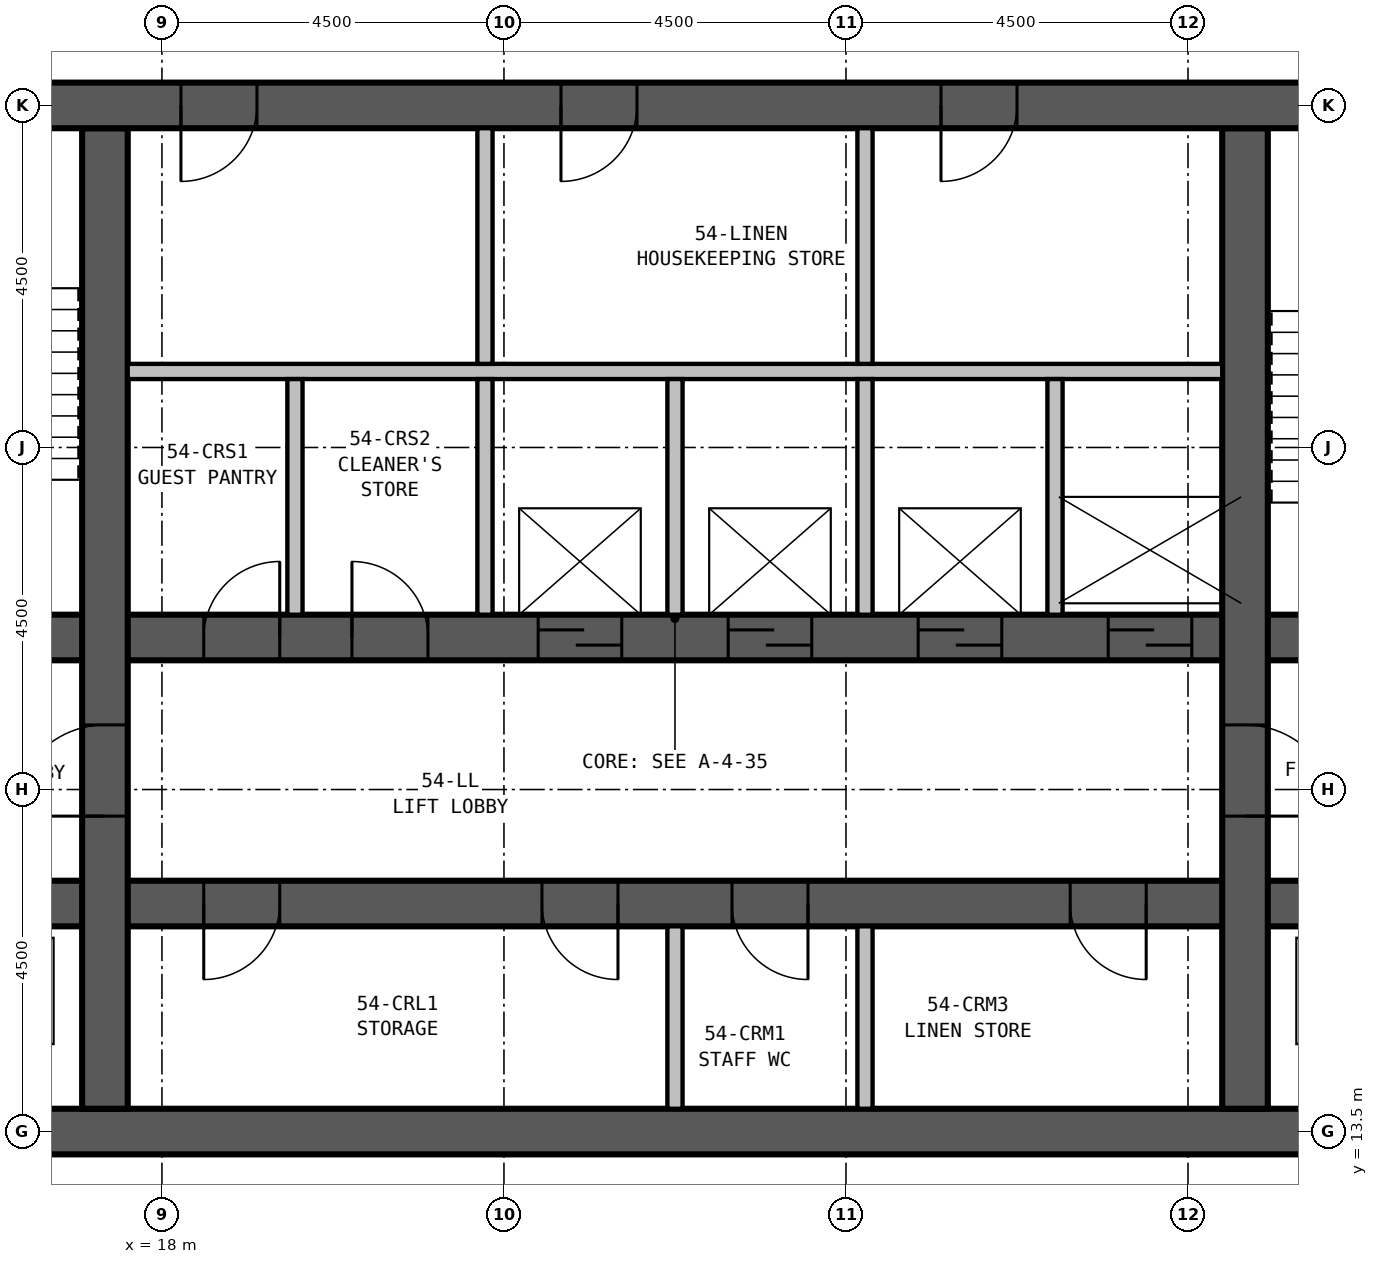
"""IFC4 building model, lengths in metres.
Left out: names, types, materials, properties, quantities, classifications, styles, units other than length and angle.
Written with IfcOpenShell. Run it as: python <this file> out.ifc"""

import sys

from ifc_helpers import new_model, si_unit, direction, frame, frame_2d, origin, place, context, subcontext, project, spatial, rectangle, extrude, element, fill, save


model = new_model("IFC4")
c1 = context("Model", 3, precision=1e-05, world=origin(), true_north=direction((0.0, 1.0)))
c2 = subcontext(c1, "Body", "Model", "MODEL_VIEW")
j1 = project(units=[si_unit("LENGTHUNIT", "METRE"), si_unit("PLANEANGLEUNIT", "RADIAN")], contexts=[c1])
p1 = place(None, origin())
s1 = spatial("IfcSite", under=j1, at=p1, CompositionType="ELEMENT")
p2 = place(p1, origin())
s2 = spatial("IfcBuilding", under=s1, at=p2, CompositionType="ELEMENT")
p3 = place(p2, frame((0.0, 0.0, 207.9)))
s3 = spatial("IfcBuildingStorey", under=s2, at=p3, CompositionType="ELEMENT", Elevation=207.9)
p4 = place(p3, frame((13.2, 13.5, 0.0), z_axis=(0.0, 0.0, 1.0), x_axis=(1.0, 0.0, 0.0)))
e1 = element("IfcWall", 1, at=p4, inside=s3, PredefinedType="SHEAR", context=c2, shape_type="SweptSolid", body=[
    extrude(rectangle(XDim=23.1, YDim=0.6, at=frame_2d((11.55, 0.0))), origin(), (0.0, 0.0, 1.0), 3.5),
])
p5 = place(p3, frame((36.3, 27.0, 0.0), z_axis=(0.0, 0.0, 1.0), x_axis=(-1.0, 0.0, 0.0)))
e2 = element("IfcWall", 2, at=p5, inside=s3, PredefinedType="SHEAR", context=c2, shape_type="SweptSolid", body=[
    extrude(rectangle(XDim=23.1, YDim=0.6, at=frame_2d((11.55, 0.0))), origin(), (0.0, 0.0, 1.0), 3.5),
])
p6 = place(p5, frame((17.05, 0.0, 0.0)))
e3 = element("IfcOpeningElement", 3, at=p6, cuts=e2, PredefinedType="OPENING", context=c2, shape_type="SweptSolid", body=[
    extrude(rectangle(XDim=1.0, YDim=2.1, at=frame_2d((0.5, 1.05))), frame((0.0, 0.31, 0.0), z_axis=(0.0, -1.0, 0.0), x_axis=(1.0, 0.0, 0.0)), (0.0, 0.0, 1.0), 0.62),
])
p7 = place(p5, frame((12.05, 0.0, 0.0)))
e4 = element("IfcOpeningElement", 4, at=p7, cuts=e2, PredefinedType="OPENING", context=c2, shape_type="SweptSolid", body=[
    extrude(rectangle(XDim=1.0, YDim=2.1, at=frame_2d((0.5, 1.05))), frame((0.0, 0.31, 0.0), z_axis=(0.0, -1.0, 0.0), x_axis=(1.0, 0.0, 0.0)), (0.0, 0.0, 1.0), 0.62),
])
p8 = place(p5, frame((7.05, 0.0, 0.0)))
e5 = element("IfcOpeningElement", 5, at=p8, cuts=e2, PredefinedType="OPENING", context=c2, shape_type="SweptSolid", body=[
    extrude(rectangle(XDim=1.0, YDim=2.1, at=frame_2d((0.5, 1.05))), frame((0.0, 0.31, 0.0), z_axis=(0.0, -1.0, 0.0), x_axis=(1.0, 0.0, 0.0)), (0.0, 0.0, 1.0), 0.62),
])
p9 = place(p3, frame((17.25, 13.8, 0.0), z_axis=(0.0, 0.0, 1.0), x_axis=(0.0, 1.0, 0.0)))
e6 = element("IfcWall", 6, at=p9, inside=s3, PredefinedType="SHEAR", context=c2, shape_type="SweptSolid", body=[
    extrude(rectangle(XDim=12.9, YDim=0.6, at=frame_2d((6.45, 0.0))), origin(), (0.0, 0.0, 1.0), 3.5),
])
p10 = place(p9, frame((3.85, 0.0, 0.0)))
e7 = element("IfcOpeningElement", 7, at=p10, cuts=e6, PredefinedType="OPENING", context=c2, shape_type="SweptSolid", body=[
    extrude(rectangle(XDim=1.2, YDim=2.1, at=frame_2d((0.6, 1.05))), frame((0.0, 0.31, 0.0), z_axis=(0.0, -1.0, 0.0), x_axis=(1.0, 0.0, 0.0)), (0.0, 0.0, 1.0), 0.62),
])
p11 = place(p3, frame((32.25, 13.8, 0.0), z_axis=(0.0, 0.0, 1.0), x_axis=(0.0, 1.0, 0.0)))
e8 = element("IfcWall", 8, at=p11, inside=s3, PredefinedType="SHEAR", context=c2, shape_type="SweptSolid", body=[
    extrude(rectangle(XDim=12.9, YDim=0.6, at=frame_2d((6.45, 0.0))), origin(), (0.0, 0.0, 1.0), 3.5),
])
p12 = place(p11, frame((5.05, 0.0, 0.0), z_axis=(0.0, 0.0, 1.0), x_axis=(-1.0, 0.0, 0.0)))
e9 = element("IfcOpeningElement", 9, at=p12, cuts=e8, PredefinedType="OPENING", context=c2, shape_type="SweptSolid", body=[
    extrude(rectangle(XDim=1.2, YDim=2.1, at=frame_2d((0.6, 1.05))), frame((0.0, 0.31, 0.0), z_axis=(0.0, -1.0, 0.0), x_axis=(1.0, 0.0, 0.0)), (0.0, 0.0, 1.0), 0.62),
])
p13 = place(p3, frame((13.8, 16.5, 0.0), z_axis=(0.0, 0.0, 1.0), x_axis=(1.0, 0.0, 0.0)))
e10 = element("IfcWall", 10, at=p13, inside=s3, PredefinedType="SHEAR", context=c2, shape_type="SweptSolid", body=[
    extrude(rectangle(XDim=21.9, YDim=0.6, at=frame_2d((10.95, 0.0))), origin(), (0.0, 0.0, 1.0), 3.5),
])
p14 = place(p13, frame((5.75, 0.0, 0.0), z_axis=(0.0, 0.0, 1.0), x_axis=(-1.0, 0.0, 0.0)))
e11 = element("IfcOpeningElement", 11, at=p14, cuts=e10, PredefinedType="OPENING", context=c2, shape_type="SweptSolid", body=[
    extrude(rectangle(XDim=1.0, YDim=2.1, at=frame_2d((0.5, 1.05))), frame((0.0, 0.31, 0.0), z_axis=(0.0, -1.0, 0.0), x_axis=(1.0, 0.0, 0.0)), (0.0, 0.0, 1.0), 0.62),
])
p15 = place(p13, frame((10.2, 0.0, 0.0), z_axis=(0.0, 0.0, 1.0), x_axis=(-1.0, 0.0, 0.0)))
e12 = element("IfcOpeningElement", 12, at=p15, cuts=e10, PredefinedType="OPENING", context=c2, shape_type="SweptSolid", body=[
    extrude(rectangle(XDim=1.0, YDim=2.1, at=frame_2d((0.5, 1.05))), frame((0.0, 0.31, 0.0), z_axis=(0.0, -1.0, 0.0), x_axis=(1.0, 0.0, 0.0)), (0.0, 0.0, 1.0), 0.62),
])
p16 = place(p13, frame((12.7, 0.0, 0.0), z_axis=(0.0, 0.0, 1.0), x_axis=(-1.0, 0.0, 0.0)))
e13 = element("IfcOpeningElement", 13, at=p16, cuts=e10, PredefinedType="OPENING", context=c2, shape_type="SweptSolid", body=[
    extrude(rectangle(XDim=1.0, YDim=2.1, at=frame_2d((0.5, 1.05))), frame((0.0, 0.31, 0.0), z_axis=(0.0, -1.0, 0.0), x_axis=(1.0, 0.0, 0.0)), (0.0, 0.0, 1.0), 0.62),
])
p17 = place(p13, frame((17.15, 0.0, 0.0), z_axis=(0.0, 0.0, 1.0), x_axis=(-1.0, 0.0, 0.0)))
e14 = element("IfcOpeningElement", 14, at=p17, cuts=e10, PredefinedType="OPENING", context=c2, shape_type="SweptSolid", body=[
    extrude(rectangle(XDim=1.0, YDim=2.1, at=frame_2d((0.5, 1.05))), frame((0.0, 0.31, 0.0), z_axis=(0.0, -1.0, 0.0), x_axis=(1.0, 0.0, 0.0)), (0.0, 0.0, 1.0), 0.62),
])
p18 = place(p13, frame((0.6, 0.0, 0.0)))
e15 = element("IfcOpeningElement", 15, at=p18, cuts=e10, PredefinedType="OPENING", context=c2, shape_type="SweptSolid", body=[
    extrude(rectangle(XDim=1.2, YDim=2.1, at=frame_2d((0.6, 1.05))), frame((0.0, 0.31, 0.0), z_axis=(0.0, -1.0, 0.0), x_axis=(1.0, 0.0, 0.0)), (0.0, 0.0, 1.0), 0.62),
])
p19 = place(p13, frame((19.6, 0.0, 0.0)))
e16 = element("IfcOpeningElement", 16, at=p19, cuts=e10, PredefinedType="OPENING", context=c2, shape_type="SweptSolid", body=[
    extrude(rectangle(XDim=1.2, YDim=2.1, at=frame_2d((0.6, 1.05))), frame((0.0, 0.31, 0.0), z_axis=(0.0, -1.0, 0.0), x_axis=(1.0, 0.0, 0.0)), (0.0, 0.0, 1.0), 0.62),
])
p20 = place(p3, frame((13.8, 20.0, 0.0), z_axis=(0.0, 0.0, 1.0), x_axis=(1.0, 0.0, 0.0)))
e17 = element("IfcWall", 17, at=p20, inside=s3, PredefinedType="SHEAR", context=c2, shape_type="SweptSolid", body=[
    extrude(rectangle(XDim=21.9, YDim=0.6, at=frame_2d((10.95, 0.0))), origin(), (0.0, 0.0, 1.0), 3.5),
])
p21 = place(p20, frame((0.5, 0.0, 0.0)))
e18 = element("IfcOpeningElement", 18, at=p21, cuts=e17, PredefinedType="OPENING", context=c2, shape_type="SweptSolid", body=[
    extrude(rectangle(XDim=1.0, YDim=2.1, at=frame_2d((0.5, 1.05))), frame((0.0, 0.31, 0.0), z_axis=(0.0, -1.0, 0.0), x_axis=(1.0, 0.0, 0.0)), (0.0, 0.0, 1.0), 0.62),
])
p22 = place(p20, frame((20.5, 0.0, 0.0)))
e19 = element("IfcOpeningElement", 19, at=p22, cuts=e17, PredefinedType="OPENING", context=c2, shape_type="SweptSolid", body=[
    extrude(rectangle(XDim=1.0, YDim=2.1, at=frame_2d((0.5, 1.05))), frame((0.0, 0.31, 0.0), z_axis=(0.0, -1.0, 0.0), x_axis=(1.0, 0.0, 0.0)), (0.0, 0.0, 1.0), 0.62),
])
p23 = place(p20, frame((9.15, 0.0, 0.0)))
e20 = element("IfcOpeningElement", 20, at=p23, cuts=e17, PredefinedType="OPENING", context=c2, shape_type="SweptSolid", body=[
    extrude(rectangle(XDim=1.1, YDim=2.1, at=frame_2d((0.55, 1.05))), frame((0.0, 0.31, 0.0), z_axis=(0.0, -1.0, 0.0), x_axis=(1.0, 0.0, 0.0)), (0.0, 0.0, 1.0), 0.62),
])
p24 = place(p20, frame((11.65, 0.0, 0.0)))
e21 = element("IfcOpeningElement", 21, at=p24, cuts=e17, PredefinedType="OPENING", context=c2, shape_type="SweptSolid", body=[
    extrude(rectangle(XDim=1.1, YDim=2.1, at=frame_2d((0.55, 1.05))), frame((0.0, 0.31, 0.0), z_axis=(0.0, -1.0, 0.0), x_axis=(1.0, 0.0, 0.0)), (0.0, 0.0, 1.0), 0.62),
])
p25 = place(p20, frame((14.15, 0.0, 0.0)))
e22 = element("IfcOpeningElement", 22, at=p25, cuts=e17, PredefinedType="OPENING", context=c2, shape_type="SweptSolid", body=[
    extrude(rectangle(XDim=1.1, YDim=2.1, at=frame_2d((0.55, 1.05))), frame((0.0, 0.31, 0.0), z_axis=(0.0, -1.0, 0.0), x_axis=(1.0, 0.0, 0.0)), (0.0, 0.0, 1.0), 0.62),
])
p26 = place(p20, frame((16.65, 0.0, 0.0)))
e23 = element("IfcOpeningElement", 23, at=p26, cuts=e17, PredefinedType="OPENING", context=c2, shape_type="SweptSolid", body=[
    extrude(rectangle(XDim=1.1, YDim=2.1, at=frame_2d((0.55, 1.05))), frame((0.0, 0.31, 0.0), z_axis=(0.0, -1.0, 0.0), x_axis=(1.0, 0.0, 0.0)), (0.0, 0.0, 1.0), 0.62),
])
p27 = place(p20, frame((4.75, 0.0, 0.0)))
e24 = element("IfcOpeningElement", 24, at=p27, cuts=e17, PredefinedType="OPENING", context=c2, shape_type="SweptSolid", body=[
    extrude(rectangle(XDim=1.0, YDim=2.1, at=frame_2d((0.5, 1.05))), frame((0.0, 0.31, 0.0), z_axis=(0.0, -1.0, 0.0), x_axis=(1.0, 0.0, 0.0)), (0.0, 0.0, 1.0), 0.62),
])
p28 = place(p20, frame((6.7, 0.0, 0.0)))
e25 = element("IfcOpeningElement", 25, at=p28, cuts=e17, PredefinedType="OPENING", context=c2, shape_type="SweptSolid", body=[
    extrude(rectangle(XDim=1.0, YDim=2.1, at=frame_2d((0.5, 1.05))), frame((0.0, 0.31, 0.0), z_axis=(0.0, -1.0, 0.0), x_axis=(1.0, 0.0, 0.0)), (0.0, 0.0, 1.0), 0.62),
])
for number, where, z_axis, x_axis in (
    (26, (19.75, 20.3, 0.0), (0.0, 0.0, 1.0), (0.0, 1.0, 0.0)),
    (27, (22.25, 20.3, 0.0), (0.0, 0.0, 1.0), (0.0, 1.0, 0.0)),
):
    element("IfcWall", number, at=place(p3, frame(where, z_axis=z_axis, x_axis=x_axis)), inside=s3, PredefinedType="PARTITIONING", context=c2, shape_type="SweptSolid", body=[
        extrude(rectangle(XDim=3.1, YDim=0.2, at=frame_2d((1.55, 0.0))), origin(), (0.0, 0.0, 1.0), 3.25),
    ])
p29 = place(p3, frame((24.75, 13.8, 0.0), z_axis=(0.0, 0.0, 1.0), x_axis=(0.0, 1.0, 0.0)))
e28 = element("IfcWall", 28, at=p29, inside=s3, PredefinedType="PARTITIONING", context=c2, shape_type="SweptSolid", body=[
    extrude(rectangle(XDim=2.4, YDim=0.2, at=frame_2d((1.2, 0.0))), origin(), (0.0, 0.0, 1.0), 3.25),
])
p30 = place(p3, frame((24.75, 20.3, 0.0), z_axis=(0.0, 0.0, 1.0), x_axis=(0.0, 1.0, 0.0)))
e29 = element("IfcWall", 29, at=p30, inside=s3, PredefinedType="PARTITIONING", context=c2, shape_type="SweptSolid", body=[
    extrude(rectangle(XDim=3.1, YDim=0.2, at=frame_2d((1.55, 0.0))), origin(), (0.0, 0.0, 1.0), 3.25),
])
p31 = place(p3, frame((27.25, 13.8, 0.0), z_axis=(0.0, 0.0, 1.0), x_axis=(0.0, 1.0, 0.0)))
e30 = element("IfcWall", 30, at=p31, inside=s3, PredefinedType="PARTITIONING", context=c2, shape_type="SweptSolid", body=[
    extrude(rectangle(XDim=2.4, YDim=0.2, at=frame_2d((1.2, 0.0))), origin(), (0.0, 0.0, 1.0), 3.25),
])
for number, where, z_axis, x_axis in (
    (31, (27.25, 20.3, 0.0), (0.0, 0.0, 1.0), (0.0, 1.0, 0.0)),
    (32, (29.75, 20.3, 0.0), (0.0, 0.0, 1.0), (0.0, 1.0, 0.0)),
):
    element("IfcWall", number, at=place(p3, frame(where, z_axis=z_axis, x_axis=x_axis)), inside=s3, PredefinedType="PARTITIONING", context=c2, shape_type="SweptSolid", body=[
        extrude(rectangle(XDim=3.1, YDim=0.2, at=frame_2d((1.55, 0.0))), origin(), (0.0, 0.0, 1.0), 3.25),
    ])
p32 = place(p3, frame((17.55, 23.5, 0.0), z_axis=(0.0, 0.0, 1.0), x_axis=(1.0, 0.0, 0.0)))
e33 = element("IfcWall", 33, at=p32, inside=s3, PredefinedType="PARTITIONING", context=c2, shape_type="SweptSolid", body=[
    extrude(rectangle(XDim=14.4, YDim=0.2, at=frame_2d((7.2, 0.0))), origin(), (0.0, 0.0, 1.0), 3.25),
])
for number, where, z_axis, x_axis in (
    (34, (22.25, 23.6, 0.0), (0.0, 0.0, 1.0), (0.0, 1.0, 0.0)),
    (35, (27.25, 23.6, 0.0), (0.0, 0.0, 1.0), (0.0, 1.0, 0.0)),
):
    element("IfcWall", number, at=place(p3, frame(where, z_axis=z_axis, x_axis=x_axis)), inside=s3, PredefinedType="PARTITIONING", context=c2, shape_type="SweptSolid", body=[
        extrude(rectangle(XDim=3.1, YDim=0.2, at=frame_2d((1.55, 0.0))), origin(), (0.0, 0.0, 1.0), 3.25),
    ])
p33 = place(p10, origin())
e36 = element("IfcDoor", 36, at=p33, inside=s3, OperationType="SINGLE_SWING_LEFT", PredefinedType="DOOR", context=c2, shape_type="SweptSolid", body=[
    extrude(rectangle(XDim=1.2, YDim=2.1, at=frame_2d((0.6, 1.05))), frame((0.0, 0.3, 0.0), z_axis=(0.0, -1.0, 0.0), x_axis=(1.0, 0.0, 0.0)), (0.0, 0.0, 1.0), 0.6),
])
fill(e7, e36)
p34 = place(p12, origin())
e37 = element("IfcDoor", 37, at=p34, inside=s3, OperationType="SINGLE_SWING_RIGHT", PredefinedType="DOOR", context=c2, shape_type="SweptSolid", body=[
    extrude(rectangle(XDim=1.2, YDim=2.1, at=frame_2d((0.6, 1.05))), frame((0.0, 0.3, 0.0), z_axis=(0.0, -1.0, 0.0), x_axis=(1.0, 0.0, 0.0)), (0.0, 0.0, 1.0), 0.6),
])
fill(e9, e37)
p35 = place(p23, origin())
e38 = element("IfcDoor", 38, at=p35, inside=s3, OperationType="SLIDING_TO_LEFT", PredefinedType="DOOR", context=c2, shape_type="SweptSolid", body=[
    extrude(rectangle(XDim=1.1, YDim=2.1, at=frame_2d((0.55, 1.05))), frame((0.0, 0.3, 0.0), z_axis=(0.0, -1.0, 0.0), x_axis=(1.0, 0.0, 0.0)), (0.0, 0.0, 1.0), 0.6),
])
fill(e20, e38)
p36 = place(p24, origin())
e39 = element("IfcDoor", 39, at=p36, inside=s3, OperationType="SLIDING_TO_LEFT", PredefinedType="DOOR", context=c2, shape_type="SweptSolid", body=[
    extrude(rectangle(XDim=1.1, YDim=2.1, at=frame_2d((0.55, 1.05))), frame((0.0, 0.3, 0.0), z_axis=(0.0, -1.0, 0.0), x_axis=(1.0, 0.0, 0.0)), (0.0, 0.0, 1.0), 0.6),
])
fill(e21, e39)
p37 = place(p25, origin())
e40 = element("IfcDoor", 40, at=p37, inside=s3, OperationType="SLIDING_TO_LEFT", PredefinedType="DOOR", context=c2, shape_type="SweptSolid", body=[
    extrude(rectangle(XDim=1.1, YDim=2.1, at=frame_2d((0.55, 1.05))), frame((0.0, 0.3, 0.0), z_axis=(0.0, -1.0, 0.0), x_axis=(1.0, 0.0, 0.0)), (0.0, 0.0, 1.0), 0.6),
])
fill(e22, e40)
p38 = place(p26, origin())
e41 = element("IfcDoor", 41, at=p38, inside=s3, OperationType="SLIDING_TO_LEFT", PredefinedType="DOOR", context=c2, shape_type="SweptSolid", body=[
    extrude(rectangle(XDim=1.1, YDim=2.1, at=frame_2d((0.55, 1.05))), frame((0.0, 0.3, 0.0), z_axis=(0.0, -1.0, 0.0), x_axis=(1.0, 0.0, 0.0)), (0.0, 0.0, 1.0), 0.6),
])
fill(e23, e41)
p39 = place(p14, origin())
e42 = element("IfcDoor", 42, at=p39, inside=s3, OperationType="SINGLE_SWING_RIGHT", PredefinedType="DOOR", context=c2, shape_type="SweptSolid", body=[
    extrude(rectangle(XDim=1.0, YDim=2.1, at=frame_2d((0.5, 1.05))), frame((0.0, 0.3, 0.0), z_axis=(0.0, -1.0, 0.0), x_axis=(1.0, 0.0, 0.0)), (0.0, 0.0, 1.0), 0.6),
])
fill(e11, e42)
p40 = place(p15, origin())
e43 = element("IfcDoor", 43, at=p40, inside=s3, OperationType="SINGLE_SWING_LEFT", PredefinedType="DOOR", context=c2, shape_type="SweptSolid", body=[
    extrude(rectangle(XDim=1.0, YDim=2.1, at=frame_2d((0.5, 1.05))), frame((0.0, 0.3, 0.0), z_axis=(0.0, -1.0, 0.0), x_axis=(1.0, 0.0, 0.0)), (0.0, 0.0, 1.0), 0.6),
])
fill(e12, e43)
p41 = place(p16, origin())
e44 = element("IfcDoor", 44, at=p41, inside=s3, OperationType="SINGLE_SWING_LEFT", PredefinedType="DOOR", context=c2, shape_type="SweptSolid", body=[
    extrude(rectangle(XDim=1.0, YDim=2.1, at=frame_2d((0.5, 1.05))), frame((0.0, 0.3, 0.0), z_axis=(0.0, -1.0, 0.0), x_axis=(1.0, 0.0, 0.0)), (0.0, 0.0, 1.0), 0.6),
])
fill(e13, e44)
p42 = place(p17, origin())
e45 = element("IfcDoor", 45, at=p42, inside=s3, OperationType="SINGLE_SWING_LEFT", PredefinedType="DOOR", context=c2, shape_type="SweptSolid", body=[
    extrude(rectangle(XDim=1.0, YDim=2.1, at=frame_2d((0.5, 1.05))), frame((0.0, 0.3, 0.0), z_axis=(0.0, -1.0, 0.0), x_axis=(1.0, 0.0, 0.0)), (0.0, 0.0, 1.0), 0.6),
])
fill(e14, e45)
p43 = place(p27, origin())
e46 = element("IfcDoor", 46, at=p43, inside=s3, OperationType="SINGLE_SWING_RIGHT", PredefinedType="DOOR", context=c2, shape_type="SweptSolid", body=[
    extrude(rectangle(XDim=1.0, YDim=2.1, at=frame_2d((0.5, 1.05))), frame((0.0, 0.3, 0.0), z_axis=(0.0, -1.0, 0.0), x_axis=(1.0, 0.0, 0.0)), (0.0, 0.0, 1.0), 0.6),
])
fill(e24, e46)
p44 = place(p28, origin())
e47 = element("IfcDoor", 47, at=p44, inside=s3, OperationType="SINGLE_SWING_LEFT", PredefinedType="DOOR", context=c2, shape_type="SweptSolid", body=[
    extrude(rectangle(XDim=1.0, YDim=2.1, at=frame_2d((0.5, 1.05))), frame((0.0, 0.3, 0.0), z_axis=(0.0, -1.0, 0.0), x_axis=(1.0, 0.0, 0.0)), (0.0, 0.0, 1.0), 0.6),
])
fill(e25, e47)
p45 = place(p6, origin())
e48 = element("IfcDoor", 48, at=p45, inside=s3, OperationType="SINGLE_SWING_RIGHT", PredefinedType="DOOR", context=c2, shape_type="SweptSolid", body=[
    extrude(rectangle(XDim=1.0, YDim=2.1, at=frame_2d((0.5, 1.05))), frame((0.0, 0.3, 0.0), z_axis=(0.0, -1.0, 0.0), x_axis=(1.0, 0.0, 0.0)), (0.0, 0.0, 1.0), 0.6),
])
fill(e3, e48)
p46 = place(p7, origin())
e49 = element("IfcDoor", 49, at=p46, inside=s3, OperationType="SINGLE_SWING_RIGHT", PredefinedType="DOOR", context=c2, shape_type="SweptSolid", body=[
    extrude(rectangle(XDim=1.0, YDim=2.1, at=frame_2d((0.5, 1.05))), frame((0.0, 0.3, 0.0), z_axis=(0.0, -1.0, 0.0), x_axis=(1.0, 0.0, 0.0)), (0.0, 0.0, 1.0), 0.6),
])
fill(e4, e49)
p47 = place(p8, origin())
e50 = element("IfcDoor", 50, at=p47, inside=s3, OperationType="SINGLE_SWING_RIGHT", PredefinedType="DOOR", context=c2, shape_type="SweptSolid", body=[
    extrude(rectangle(XDim=1.0, YDim=2.1, at=frame_2d((0.5, 1.05))), frame((0.0, 0.3, 0.0), z_axis=(0.0, -1.0, 0.0), x_axis=(1.0, 0.0, 0.0)), (0.0, 0.0, 1.0), 0.6),
])
fill(e5, e50)
save(model, sys.argv[1])
